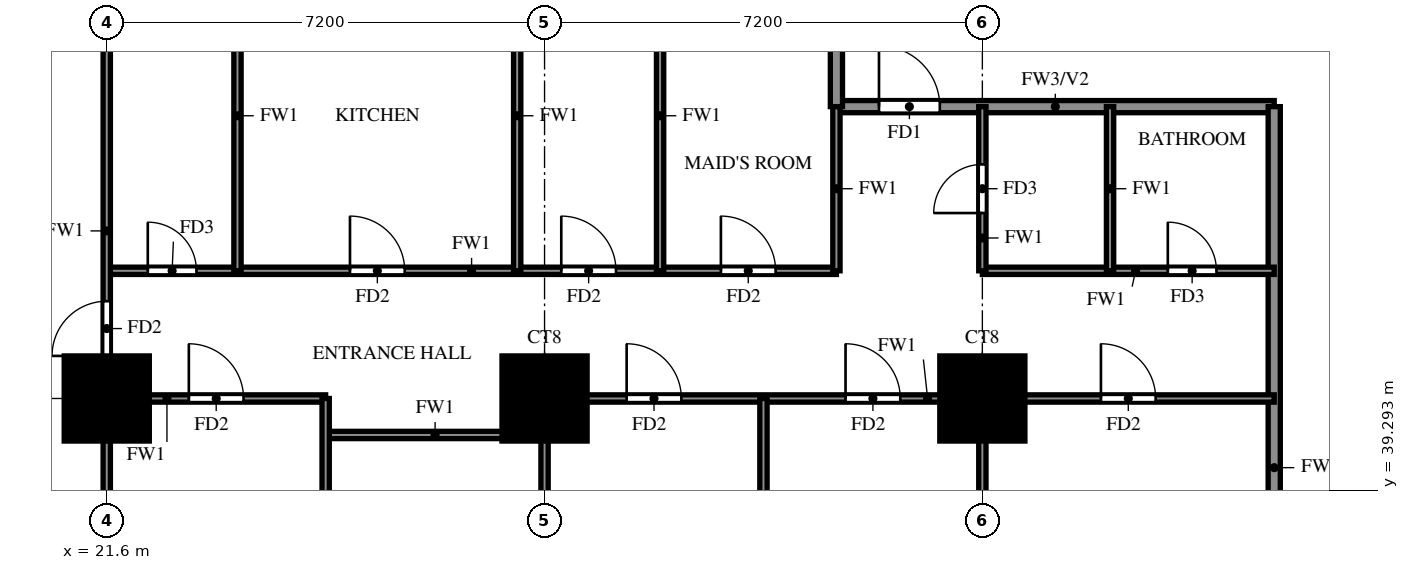
"""IFC4 building model, lengths in metres.
Left out: names, types, materials, properties, quantities, classifications, styles, units other than length and angle.
Written with IfcOpenShell. Run it as: python <this file> out.ifc"""

import sys

from ifc_helpers import new_model, si_unit, direction, frame, frame_2d, origin, origin_2d, place, context, subcontext, project, spatial, rectangle, extrude, source, transform, mapped, element, fill, save


model = new_model("IFC4")
c1 = context("Model", 3, precision=1e-05, world=origin(), true_north=direction((0.0, 1.0)))
c2 = subcontext(c1, "Body", "Model", "MODEL_VIEW")
j1 = project(units=[si_unit("LENGTHUNIT", "METRE"), si_unit("PLANEANGLEUNIT", "RADIAN")], contexts=[c1])
p1 = place(None, origin())
s1 = spatial("IfcSite", under=j1, at=p1, CompositionType="ELEMENT")
p2 = place(p1, origin())
s2 = spatial("IfcBuilding", under=s1, at=p2, CompositionType="ELEMENT")
p3 = place(p2, frame((0.0, 0.0, 58.5)))
s3 = spatial("IfcBuildingStorey", under=s2, at=p3, CompositionType="ELEMENT", Elevation=58.5)
m1 = source(origin(), c2, "Body", "SweptSolid", [
    extrude(rectangle(XDim=1.4, YDim=1.4, at=origin_2d()), origin(), (0.0, 0.0, 1.0), 3.18),
])
for number, where, z_axis, x_axis in (
    (1, (21.6, 40.8, 0.0), (0.0, 0.0, 1.0), (1.0, 0.0, 0.0)),
    (2, (28.8, 40.8, 0.0), (0.0, 0.0, 1.0), (1.0, 0.0, 0.0)),
    (3, (36.0, 40.8, 0.0), (0.0, 0.0, 1.0), (1.0, 0.0, 0.0)),
):
    element("IfcColumn", number, at=place(p3, frame(where, z_axis=z_axis, x_axis=x_axis)), inside=s3, PredefinedType="COLUMN", context=c2, shape_type="MappedRepresentation", body=[
        mapped(m1, transform((0.0, 0.0, 0.0))),
    ])
p4 = place(p3, frame((33.6, 45.6, 0.0), z_axis=(0.0, 0.0, 1.0), x_axis=(1.0, 0.0, 0.0)))
e4 = element("IfcWall", 4, at=p4, inside=s3, PredefinedType="SOLIDWALL", context=c2, shape_type="SweptSolid", body=[
    extrude(rectangle(XDim=7.2, YDim=0.2, at=frame_2d((3.6, 0.0))), origin(), (0.0, 0.0, 1.0), 3.18),
])
p5 = place(p4, frame((0.7, 0.0, 0.0)))
e5 = element("IfcOpeningElement", 5, at=p5, cuts=e4, PredefinedType="OPENING", context=c2, shape_type="SweptSolid", body=[
    extrude(rectangle(XDim=1.0, YDim=2.1, at=frame_2d((0.5, 1.05))), frame((0.0, 0.11, 0.0), z_axis=(0.0, -1.0, 0.0), x_axis=(1.0, 0.0, 0.0)), (0.0, 0.0, 1.0), 0.22),
])
p6 = place(p3, frame((33.6, 45.6, 0.0), z_axis=(0.0, 0.0, 1.0), x_axis=(0.0, 1.0, 0.0)))
e6 = element("IfcWall", 6, at=p6, inside=s3, PredefinedType="SOLIDWALL", context=c2, shape_type="SweptSolid", body=[
    extrude(rectangle(XDim=8.4, YDim=0.2, at=frame_2d((4.2, 0.0))), origin(), (0.0, 0.0, 1.0), 3.18),
])
p7 = place(p3, frame((40.8, 33.725, 0.0), z_axis=(0.0, 0.0, 1.0), x_axis=(0.0, 1.0, 0.0)))
e7 = element("IfcWall", 7, at=p7, inside=s3, PredefinedType="SOLIDWALL", context=c2, shape_type="SweptSolid", body=[
    extrude(rectangle(XDim=11.875, YDim=0.2, at=frame_2d((5.938, 0.0))), origin(), (0.0, 0.0, 1.0), 2.28),
])
p8 = place(p3, frame((25.2, 40.2, 0.0), z_axis=(0.0, 0.0, 1.0), x_axis=(1.0, 0.0, 0.0)))
e8 = element("IfcWall", 8, at=p8, inside=s3, PredefinedType="PARTITIONING", context=c2, shape_type="SweptSolid", body=[
    extrude(rectangle(XDim=3.6, YDim=0.12, at=frame_2d((1.8, 0.0))), origin(), (0.0, 0.0, 1.0), 3.18),
])
p9 = place(p3, frame((21.6, 40.8, 0.0), z_axis=(0.0, 0.0, 1.0), x_axis=(1.0, 0.0, 0.0)))
e9 = element("IfcWall", 9, at=p9, inside=s3, PredefinedType="PARTITIONING", context=c2, shape_type="SweptSolid", body=[
    extrude(rectangle(XDim=3.6, YDim=0.12, at=frame_2d((1.8, 0.0))), origin(), (0.0, 0.0, 1.0), 3.18),
])
p10 = place(p9, frame((1.35, 0.0, 0.0)))
e10 = element("IfcOpeningElement", 10, at=p10, cuts=e9, PredefinedType="OPENING", context=c2, shape_type="SweptSolid", body=[
    extrude(rectangle(XDim=0.9, YDim=2.1, at=frame_2d((0.45, 1.05))), frame((0.0, 0.07, 0.0), z_axis=(0.0, -1.0, 0.0), x_axis=(1.0, 0.0, 0.0)), (0.0, 0.0, 1.0), 0.14),
])
p11 = place(p3, frame((28.8, 40.8, 0.0), z_axis=(0.0, 0.0, 1.0), x_axis=(1.0, 0.0, 0.0)))
e11 = element("IfcWall", 11, at=p11, inside=s3, PredefinedType="PARTITIONING", context=c2, shape_type="SweptSolid", body=[
    extrude(rectangle(XDim=12.0, YDim=0.12, at=frame_2d((6.0, 0.0))), origin(), (0.0, 0.0, 1.0), 3.18),
])
p12 = place(p11, frame((1.35, 0.0, 0.0)))
e12 = element("IfcOpeningElement", 12, at=p12, cuts=e11, PredefinedType="OPENING", context=c2, shape_type="SweptSolid", body=[
    extrude(rectangle(XDim=0.9, YDim=2.1, at=frame_2d((0.45, 1.05))), frame((0.0, 0.07, 0.0), z_axis=(0.0, -1.0, 0.0), x_axis=(1.0, 0.0, 0.0)), (0.0, 0.0, 1.0), 0.14),
])
p13 = place(p11, frame((4.95, 0.0, 0.0)))
e13 = element("IfcOpeningElement", 13, at=p13, cuts=e11, PredefinedType="OPENING", context=c2, shape_type="SweptSolid", body=[
    extrude(rectangle(XDim=0.9, YDim=2.1, at=frame_2d((0.45, 1.05))), frame((0.0, 0.07, 0.0), z_axis=(0.0, -1.0, 0.0), x_axis=(1.0, 0.0, 0.0)), (0.0, 0.0, 1.0), 0.14),
])
p14 = place(p11, frame((9.15, 0.0, 0.0)))
e14 = element("IfcOpeningElement", 14, at=p14, cuts=e11, PredefinedType="OPENING", context=c2, shape_type="SweptSolid", body=[
    extrude(rectangle(XDim=0.9, YDim=2.1, at=frame_2d((0.45, 1.05))), frame((0.0, 0.07, 0.0), z_axis=(0.0, -1.0, 0.0), x_axis=(1.0, 0.0, 0.0)), (0.0, 0.0, 1.0), 0.14),
])
p15 = place(p3, frame((21.6, 42.9, 0.0), z_axis=(0.0, 0.0, 1.0), x_axis=(1.0, 0.0, 0.0)))
e15 = element("IfcWall", 15, at=p15, inside=s3, PredefinedType="PARTITIONING", context=c2, shape_type="SweptSolid", body=[
    extrude(rectangle(XDim=12.0, YDim=0.12, at=frame_2d((6.0, 0.0))), origin(), (0.0, 0.0, 1.0), 3.18),
])
p16 = place(p15, frame((0.675, 0.0, 0.0)))
e16 = element("IfcOpeningElement", 16, at=p16, cuts=e15, PredefinedType="OPENING", context=c2, shape_type="SweptSolid", body=[
    extrude(rectangle(XDim=0.8, YDim=2.1, at=frame_2d((0.4, 1.05))), frame((0.0, 0.07, 0.0), z_axis=(0.0, -1.0, 0.0), x_axis=(1.0, 0.0, 0.0)), (0.0, 0.0, 1.0), 0.14),
])
p17 = place(p15, frame((4.0, 0.0, 0.0)))
e17 = element("IfcOpeningElement", 17, at=p17, cuts=e15, PredefinedType="OPENING", context=c2, shape_type="SweptSolid", body=[
    extrude(rectangle(XDim=0.9, YDim=2.1, at=frame_2d((0.45, 1.05))), frame((0.0, 0.07, 0.0), z_axis=(0.0, -1.0, 0.0), x_axis=(1.0, 0.0, 0.0)), (0.0, 0.0, 1.0), 0.14),
])
p18 = place(p15, frame((7.475, 0.0, 0.0)))
e18 = element("IfcOpeningElement", 18, at=p18, cuts=e15, PredefinedType="OPENING", context=c2, shape_type="SweptSolid", body=[
    extrude(rectangle(XDim=0.9, YDim=2.1, at=frame_2d((0.45, 1.05))), frame((0.0, 0.07, 0.0), z_axis=(0.0, -1.0, 0.0), x_axis=(1.0, 0.0, 0.0)), (0.0, 0.0, 1.0), 0.14),
])
p19 = place(p15, frame((10.1, 0.0, 0.0)))
e19 = element("IfcOpeningElement", 19, at=p19, cuts=e15, PredefinedType="OPENING", context=c2, shape_type="SweptSolid", body=[
    extrude(rectangle(XDim=0.9, YDim=2.1, at=frame_2d((0.45, 1.05))), frame((0.0, 0.07, 0.0), z_axis=(0.0, -1.0, 0.0), x_axis=(1.0, 0.0, 0.0)), (0.0, 0.0, 1.0), 0.14),
])
p20 = place(p3, frame((36.0, 42.9, 0.0), z_axis=(0.0, 0.0, 1.0), x_axis=(1.0, 0.0, 0.0)))
e20 = element("IfcWall", 20, at=p20, inside=s3, PredefinedType="PARTITIONING", context=c2, shape_type="SweptSolid", body=[
    extrude(rectangle(XDim=4.8, YDim=0.12, at=frame_2d((2.4, 0.0))), origin(), (0.0, 0.0, 1.0), 3.18),
])
p21 = place(p20, frame((3.05, 0.0, 0.0)))
e21 = element("IfcOpeningElement", 21, at=p21, cuts=e20, PredefinedType="OPENING", context=c2, shape_type="SweptSolid", body=[
    extrude(rectangle(XDim=0.8, YDim=2.1, at=frame_2d((0.4, 1.05))), frame((0.0, 0.07, 0.0), z_axis=(0.0, -1.0, 0.0), x_axis=(1.0, 0.0, 0.0)), (0.0, 0.0, 1.0), 0.14),
])
p22 = place(p3, frame((21.6, 33.725, 0.0), z_axis=(0.0, 0.0, 1.0), x_axis=(0.0, 1.0, 0.0)))
e22 = element("IfcWall", 22, at=p22, inside=s3, PredefinedType="PARTITIONING", context=c2, shape_type="SweptSolid", body=[
    extrude(rectangle(XDim=17.875, YDim=0.12, at=frame_2d((8.938, 0.0))), origin(), (0.0, 0.0, 1.0), 3.18),
])
p23 = place(p22, frame((7.775, 0.0, 0.0)))
e23 = element("IfcOpeningElement", 23, at=p23, cuts=e22, PredefinedType="OPENING", context=c2, shape_type="SweptSolid", body=[
    extrude(rectangle(XDim=0.9, YDim=2.1, at=frame_2d((0.45, 1.05))), frame((0.0, 0.07, 0.0), z_axis=(0.0, -1.0, 0.0), x_axis=(1.0, 0.0, 0.0)), (0.0, 0.0, 1.0), 0.14),
])
p24 = place(p22, frame((15.625, 0.0, 0.0)))
e24 = element("IfcOpeningElement", 24, at=p24, cuts=e22, PredefinedType="OPENING", context=c2, shape_type="SweptSolid", body=[
    extrude(rectangle(XDim=0.9, YDim=2.1, at=frame_2d((0.45, 1.05))), frame((0.0, 0.07, 0.0), z_axis=(0.0, -1.0, 0.0), x_axis=(1.0, 0.0, 0.0)), (0.0, 0.0, 1.0), 0.14),
])
p25 = place(p3, frame((23.75, 42.9, 0.0), z_axis=(0.0, 0.0, 1.0), x_axis=(0.0, 1.0, 0.0)))
e25 = element("IfcWall", 25, at=p25, inside=s3, PredefinedType="PARTITIONING", context=c2, shape_type="SweptSolid", body=[
    extrude(rectangle(XDim=5.1, YDim=0.12, at=frame_2d((2.55, 0.0))), origin(), (0.0, 0.0, 1.0), 3.18),
])
p26 = place(p3, frame((25.2, 33.725, 0.0), z_axis=(0.0, 0.0, 1.0), x_axis=(0.0, 1.0, 0.0)))
e26 = element("IfcWall", 26, at=p26, inside=s3, PredefinedType="PARTITIONING", context=c2, shape_type="SweptSolid", body=[
    extrude(rectangle(XDim=7.075, YDim=0.12, at=frame_2d((3.538, 0.0))), origin(), (0.0, 0.0, 1.0), 2.28),
])
p27 = place(p26, frame((2.837, 0.0, 0.0)))
e27 = element("IfcOpeningElement", 27, at=p27, cuts=e26, PredefinedType="OPENING", context=c2, shape_type="SweptSolid", body=[
    extrude(rectangle(XDim=0.8, YDim=2.1, at=frame_2d((0.4, 1.05))), frame((0.0, 0.07, 0.0), z_axis=(0.0, -1.0, 0.0), x_axis=(1.0, 0.0, 0.0)), (0.0, 0.0, 1.0), 0.14),
])
p28 = place(p3, frame((28.35, 42.9, 0.0), z_axis=(0.0, 0.0, 1.0), x_axis=(0.0, 1.0, 0.0)))
e28 = element("IfcWall", 28, at=p28, inside=s3, PredefinedType="PARTITIONING", context=c2, shape_type="SweptSolid", body=[
    extrude(rectangle(XDim=5.1, YDim=0.12, at=frame_2d((2.55, 0.0))), origin(), (0.0, 0.0, 1.0), 3.18),
])
p29 = place(p3, frame((28.8, 33.725, 0.0), z_axis=(0.0, 0.0, 1.0), x_axis=(0.0, 1.0, 0.0)))
e29 = element("IfcWall", 29, at=p29, inside=s3, PredefinedType="PARTITIONING", context=c2, shape_type="SweptSolid", body=[
    extrude(rectangle(XDim=7.075, YDim=0.12, at=frame_2d((3.538, 0.0))), origin(), (0.0, 0.0, 1.0), 3.18),
])
p30 = place(p3, frame((30.7, 42.9, 0.0), z_axis=(0.0, 0.0, 1.0), x_axis=(0.0, 1.0, 0.0)))
e30 = element("IfcWall", 30, at=p30, inside=s3, PredefinedType="PARTITIONING", context=c2, shape_type="SweptSolid", body=[
    extrude(rectangle(XDim=5.1, YDim=0.12, at=frame_2d((2.55, 0.0))), origin(), (0.0, 0.0, 1.0), 3.18),
])
p31 = place(p3, frame((32.4, 33.725, 0.0), z_axis=(0.0, 0.0, 1.0), x_axis=(0.0, 1.0, 0.0)))
e31 = element("IfcWall", 31, at=p31, inside=s3, PredefinedType="PARTITIONING", context=c2, shape_type="SweptSolid", body=[
    extrude(rectangle(XDim=7.075, YDim=0.12, at=frame_2d((3.538, 0.0))), origin(), (0.0, 0.0, 1.0), 2.28),
])
p32 = place(p3, frame((33.6, 42.9, 0.0), z_axis=(0.0, 0.0, 1.0), x_axis=(0.0, 1.0, 0.0)))
e32 = element("IfcWall", 32, at=p32, inside=s3, PredefinedType="PARTITIONING", context=c2, shape_type="SweptSolid", body=[
    extrude(rectangle(XDim=2.7, YDim=0.12, at=frame_2d((1.35, 0.0))), origin(), (0.0, 0.0, 1.0), 3.18),
])
p33 = place(p3, frame((36.0, 33.725, 0.0), z_axis=(0.0, 0.0, 1.0), x_axis=(0.0, 1.0, 0.0)))
e33 = element("IfcWall", 33, at=p33, inside=s3, PredefinedType="PARTITIONING", context=c2, shape_type="SweptSolid", body=[
    extrude(rectangle(XDim=7.075, YDim=0.12, at=frame_2d((3.538, 0.0))), origin(), (0.0, 0.0, 1.0), 3.18),
])
p34 = place(p3, frame((36.0, 42.9, 0.0), z_axis=(0.0, 0.0, 1.0), x_axis=(0.0, 1.0, 0.0)))
e34 = element("IfcWall", 34, at=p34, inside=s3, PredefinedType="PARTITIONING", context=c2, shape_type="SweptSolid", body=[
    extrude(rectangle(XDim=2.7, YDim=0.12, at=frame_2d((1.35, 0.0))), origin(), (0.0, 0.0, 1.0), 3.18),
])
p35 = place(p34, frame((0.95, 0.0, 0.0)))
e35 = element("IfcOpeningElement", 35, at=p35, cuts=e34, PredefinedType="OPENING", context=c2, shape_type="SweptSolid", body=[
    extrude(rectangle(XDim=0.8, YDim=2.1, at=frame_2d((0.4, 1.05))), frame((0.0, 0.07, 0.0), z_axis=(0.0, -1.0, 0.0), x_axis=(1.0, 0.0, 0.0)), (0.0, 0.0, 1.0), 0.14),
])
p36 = place(p3, frame((38.1, 42.9, 0.0), z_axis=(0.0, 0.0, 1.0), x_axis=(0.0, 1.0, 0.0)))
e36 = element("IfcWall", 36, at=p36, inside=s3, PredefinedType="PARTITIONING", context=c2, shape_type="SweptSolid", body=[
    extrude(rectangle(XDim=2.7, YDim=0.12, at=frame_2d((1.35, 0.0))), origin(), (0.0, 0.0, 1.0), 3.18),
])
p37 = place(p5, origin())
e37 = element("IfcDoor", 37, at=p37, inside=s3, OperationType="SINGLE_SWING_LEFT", PredefinedType="DOOR", context=c2, shape_type="SweptSolid", body=[
    extrude(rectangle(XDim=1.0, YDim=2.1, at=frame_2d((0.5, 1.05))), frame((0.0, 0.025, 0.0), z_axis=(0.0, -1.0, 0.0), x_axis=(1.0, 0.0, 0.0)), (0.0, 0.0, 1.0), 0.05),
])
fill(e5, e37)
p38 = place(p23, origin())
e38 = element("IfcDoor", 38, at=p38, inside=s3, OperationType="SINGLE_SWING_LEFT", PredefinedType="DOOR", context=c2, shape_type="SweptSolid", body=[
    extrude(rectangle(XDim=0.9, YDim=2.1, at=frame_2d((0.45, 1.05))), frame((0.0, 0.025, 0.0), z_axis=(0.0, -1.0, 0.0), x_axis=(1.0, 0.0, 0.0)), (0.0, 0.0, 1.0), 0.05),
])
fill(e23, e38)
p39 = place(p10, origin())
e39 = element("IfcDoor", 39, at=p39, inside=s3, OperationType="SINGLE_SWING_LEFT", PredefinedType="DOOR", context=c2, shape_type="SweptSolid", body=[
    extrude(rectangle(XDim=0.9, YDim=2.1, at=frame_2d((0.45, 1.05))), frame((0.0, 0.025, 0.0), z_axis=(0.0, -1.0, 0.0), x_axis=(1.0, 0.0, 0.0)), (0.0, 0.0, 1.0), 0.05),
])
fill(e10, e39)
p40 = place(p12, origin())
e40 = element("IfcDoor", 40, at=p40, inside=s3, OperationType="SINGLE_SWING_RIGHT", PredefinedType="DOOR", context=c2, shape_type="SweptSolid", body=[
    extrude(rectangle(XDim=0.9, YDim=2.1, at=frame_2d((0.45, 1.05))), frame((0.0, 0.025, 0.0), z_axis=(0.0, -1.0, 0.0), x_axis=(1.0, 0.0, 0.0)), (0.0, 0.0, 1.0), 0.05),
])
fill(e12, e40)
p41 = place(p13, origin())
e41 = element("IfcDoor", 41, at=p41, inside=s3, OperationType="SINGLE_SWING_LEFT", PredefinedType="DOOR", context=c2, shape_type="SweptSolid", body=[
    extrude(rectangle(XDim=0.9, YDim=2.1, at=frame_2d((0.45, 1.05))), frame((0.0, 0.025, 0.0), z_axis=(0.0, -1.0, 0.0), x_axis=(1.0, 0.0, 0.0)), (0.0, 0.0, 1.0), 0.05),
])
fill(e13, e41)
p42 = place(p14, origin())
e42 = element("IfcDoor", 42, at=p42, inside=s3, OperationType="SINGLE_SWING_LEFT", PredefinedType="DOOR", context=c2, shape_type="SweptSolid", body=[
    extrude(rectangle(XDim=0.9, YDim=2.1, at=frame_2d((0.45, 1.05))), frame((0.0, 0.025, 0.0), z_axis=(0.0, -1.0, 0.0), x_axis=(1.0, 0.0, 0.0)), (0.0, 0.0, 1.0), 0.05),
])
fill(e14, e42)
p43 = place(p16, origin())
e43 = element("IfcDoor", 43, at=p43, inside=s3, OperationType="SINGLE_SWING_RIGHT", PredefinedType="DOOR", context=c2, shape_type="SweptSolid", body=[
    extrude(rectangle(XDim=0.8, YDim=2.1, at=frame_2d((0.4, 1.05))), frame((0.0, 0.025, 0.0), z_axis=(0.0, -1.0, 0.0), x_axis=(1.0, 0.0, 0.0)), (0.0, 0.0, 1.0), 0.05),
])
fill(e16, e43)
p44 = place(p17, origin())
e44 = element("IfcDoor", 44, at=p44, inside=s3, OperationType="SINGLE_SWING_LEFT", PredefinedType="DOOR", context=c2, shape_type="SweptSolid", body=[
    extrude(rectangle(XDim=0.9, YDim=2.1, at=frame_2d((0.45, 1.05))), frame((0.0, 0.025, 0.0), z_axis=(0.0, -1.0, 0.0), x_axis=(1.0, 0.0, 0.0)), (0.0, 0.0, 1.0), 0.05),
])
fill(e17, e44)
p45 = place(p18, origin())
e45 = element("IfcDoor", 45, at=p45, inside=s3, OperationType="SINGLE_SWING_LEFT", PredefinedType="DOOR", context=c2, shape_type="SweptSolid", body=[
    extrude(rectangle(XDim=0.9, YDim=2.1, at=frame_2d((0.45, 1.05))), frame((0.0, 0.025, 0.0), z_axis=(0.0, -1.0, 0.0), x_axis=(1.0, 0.0, 0.0)), (0.0, 0.0, 1.0), 0.05),
])
fill(e18, e45)
p46 = place(p19, origin())
e46 = element("IfcDoor", 46, at=p46, inside=s3, OperationType="SINGLE_SWING_RIGHT", PredefinedType="DOOR", context=c2, shape_type="SweptSolid", body=[
    extrude(rectangle(XDim=0.9, YDim=2.1, at=frame_2d((0.45, 1.05))), frame((0.0, 0.025, 0.0), z_axis=(0.0, -1.0, 0.0), x_axis=(1.0, 0.0, 0.0)), (0.0, 0.0, 1.0), 0.05),
])
fill(e19, e46)
p47 = place(p35, origin())
e47 = element("IfcDoor", 47, at=p47, inside=s3, OperationType="SINGLE_SWING_LEFT", PredefinedType="DOOR", context=c2, shape_type="SweptSolid", body=[
    extrude(rectangle(XDim=0.8, YDim=2.1, at=frame_2d((0.4, 1.05))), frame((0.0, 0.025, 0.0), z_axis=(0.0, -1.0, 0.0), x_axis=(1.0, 0.0, 0.0)), (0.0, 0.0, 1.0), 0.05),
])
fill(e35, e47)
p48 = place(p21, origin())
e48 = element("IfcDoor", 48, at=p48, inside=s3, OperationType="SINGLE_SWING_LEFT", PredefinedType="DOOR", context=c2, shape_type="SweptSolid", body=[
    extrude(rectangle(XDim=0.8, YDim=2.1, at=frame_2d((0.4, 1.05))), frame((0.0, 0.025, 0.0), z_axis=(0.0, -1.0, 0.0), x_axis=(1.0, 0.0, 0.0)), (0.0, 0.0, 1.0), 0.05),
])
fill(e21, e48)
save(model, sys.argv[1])
